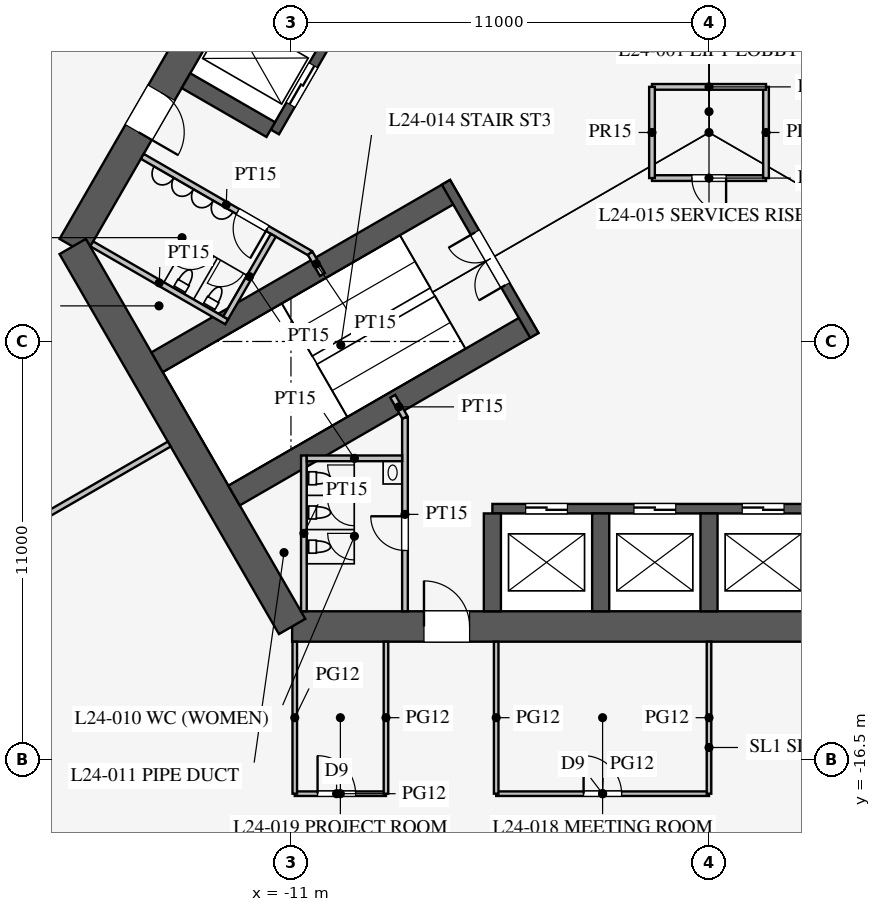
"""IFC4 building model, lengths in metres.
Left out: names, types, materials, properties, quantities, classifications, styles, units other than length and angle.
Written with IfcOpenShell. Run it as: python <this file> out.ifc"""

import sys

from ifc_helpers import new_model, si_unit, direction, frame, frame_2d, origin, place, context, subcontext, project, spatial, rectangle, extrude, element, fill, save


model = new_model("IFC4")
c1 = context("Model", 3, precision=1e-05, world=origin(), true_north=direction((0.0, 1.0)))
c2 = subcontext(c1, "Body", "Model", "MODEL_VIEW")
j1 = project(units=[si_unit("LENGTHUNIT", "METRE"), si_unit("PLANEANGLEUNIT", "RADIAN")], contexts=[c1])
p1 = place(None, origin())
s1 = spatial("IfcSite", under=j1, at=p1, CompositionType="ELEMENT")
p2 = place(p1, origin())
s2 = spatial("IfcBuilding", under=s1, at=p2, CompositionType="ELEMENT")
p3 = place(p2, frame((0.0, 0.0, 107.3)))
s3 = spatial("IfcBuildingStorey", under=s2, at=p3, CompositionType="ELEMENT", Elevation=107.3)
p4 = place(p3, frame((-10.97, -13.0, 0.0), z_axis=(0.0, 0.0, 1.0), x_axis=(1.0, 0.0, 0.0)))
e1 = element("IfcWall", 1, at=p4, inside=s3, PredefinedType="SHEAR", context=c2, shape_type="SweptSolid", body=[
    extrude(rectangle(XDim=21.939, YDim=0.8, at=frame_2d((10.97, 0.0))), origin(), (0.0, 0.0, 1.0), 4.2),
])
p5 = place(p4, frame((17.27, 0.0, 0.0)))
e2 = element("IfcOpeningElement", 2, at=p5, cuts=e1, PredefinedType="OPENING", context=c2, shape_type="SweptSolid", body=[
    extrude(rectangle(XDim=1.2, YDim=2.1, at=frame_2d((0.6, 1.05))), frame((0.0, 0.41, 0.0), z_axis=(0.0, -1.0, 0.0), x_axis=(1.0, 0.0, 0.0)), (0.0, 0.0, 1.0), 0.82),
])
p6 = place(p4, frame((3.47, 0.0, 0.0)))
e3 = element("IfcOpeningElement", 3, at=p6, cuts=e1, PredefinedType="OPENING", context=c2, shape_type="SweptSolid", body=[
    extrude(rectangle(XDim=1.2, YDim=2.1, at=frame_2d((0.6, 1.05))), frame((0.0, 0.41, 0.0), z_axis=(0.0, -1.0, 0.0), x_axis=(1.0, 0.0, 0.0)), (0.0, 0.0, 1.0), 0.82),
])
p7 = place(p3, frame((-5.773, 16.0, 0.0), z_axis=(0.0, 0.0, 1.0), x_axis=(-0.500002442456, -0.866023993627, 0.0)))
e4 = element("IfcWall", 4, at=p7, inside=s3, PredefinedType="SHEAR", context=c2, shape_type="SweptSolid", body=[
    extrude(rectangle(XDim=21.939, YDim=0.8, at=frame_2d((10.97, 0.0))), origin(), (0.0, 0.0, 1.0), 4.2),
])
p8 = place(p7, frame((17.27, 0.0, 0.0)))
e5 = element("IfcOpeningElement", 5, at=p8, cuts=e4, PredefinedType="OPENING", context=c2, shape_type="SweptSolid", body=[
    extrude(rectangle(XDim=1.2, YDim=2.1, at=frame_2d((0.6, 1.05))), frame((0.0, 0.41, 0.0), z_axis=(0.0, -1.0, 0.0), x_axis=(1.0, 0.0, 0.0)), (0.0, 0.0, 1.0), 0.82),
])
p9 = place(p7, frame((3.47, 0.0, 0.0)))
e6 = element("IfcOpeningElement", 6, at=p9, cuts=e4, PredefinedType="OPENING", context=c2, shape_type="SweptSolid", body=[
    extrude(rectangle(XDim=1.2, YDim=2.1, at=frame_2d((0.6, 1.05))), frame((0.0, 0.41, 0.0), z_axis=(0.0, -1.0, 0.0), x_axis=(1.0, 0.0, 0.0)), (0.0, 0.0, 1.0), 0.82),
])
p10 = place(p3, frame((-16.743, -3.0, 0.0), z_axis=(0.0, 0.0, 1.0), x_axis=(0.499995765644, -0.866027848477, 0.0)))
e7 = element("IfcWall", 7, at=p10, inside=s3, PredefinedType="SHEAR", context=c2, shape_type="SweptSolid", body=[
    extrude(rectangle(XDim=11.547, YDim=0.8, at=frame_2d((5.773, 0.0))), origin(), (0.0, 0.0, 1.0), 4.2),
])
p11 = place(p3, frame((-5.7, -9.9, 0.0), z_axis=(0.0, 0.0, 1.0), x_axis=(1.0, 0.0, 0.0)))
e8 = element("IfcWall", 8, at=p11, inside=s3, PredefinedType="SHEAR", context=c2, shape_type="SweptSolid", body=[
    extrude(rectangle(XDim=11.4, YDim=0.25, at=frame_2d((5.7, 0.0))), origin(), (0.0, 0.0, 1.0), 4.2),
])
p12 = place(p11, frame((0.875, 0.0, 0.0)))
e9 = element("IfcOpeningElement", 9, at=p12, cuts=e8, PredefinedType="OPENING", context=c2, shape_type="SweptSolid", body=[
    extrude(rectangle(XDim=1.1, YDim=2.2, at=frame_2d((0.55, 1.1))), frame((0.0, 0.135, 0.0), z_axis=(0.0, -1.0, 0.0), x_axis=(1.0, 0.0, 0.0)), (0.0, 0.0, 1.0), 0.27),
])
p13 = place(p11, frame((3.725, 0.0, 0.0)))
e10 = element("IfcOpeningElement", 10, at=p13, cuts=e8, PredefinedType="OPENING", context=c2, shape_type="SweptSolid", body=[
    extrude(rectangle(XDim=1.1, YDim=2.2, at=frame_2d((0.55, 1.1))), frame((0.0, 0.135, 0.0), z_axis=(0.0, -1.0, 0.0), x_axis=(1.0, 0.0, 0.0)), (0.0, 0.0, 1.0), 0.27),
])
p14 = place(p11, frame((6.575, 0.0, 0.0)))
e11 = element("IfcOpeningElement", 11, at=p14, cuts=e8, PredefinedType="OPENING", context=c2, shape_type="SweptSolid", body=[
    extrude(rectangle(XDim=1.1, YDim=2.2, at=frame_2d((0.55, 1.1))), frame((0.0, 0.135, 0.0), z_axis=(0.0, -1.0, 0.0), x_axis=(1.0, 0.0, 0.0)), (0.0, 0.0, 1.0), 0.27),
])
p15 = place(p11, frame((9.425, 0.0, 0.0)))
e12 = element("IfcOpeningElement", 12, at=p15, cuts=e8, PredefinedType="OPENING", context=c2, shape_type="SweptSolid", body=[
    extrude(rectangle(XDim=1.1, YDim=2.2, at=frame_2d((0.55, 1.1))), frame((0.0, 0.135, 0.0), z_axis=(0.0, -1.0, 0.0), x_axis=(1.0, 0.0, 0.0)), (0.0, 0.0, 1.0), 0.27),
])
for number, where, z_axis, x_axis in (
    (13, (-5.7, -10.025, 0.0), (0.0, 0.0, 1.0), (0.0, -1.0, 0.0)),
    (14, (-2.85, -10.025, 0.0), (0.0, 0.0, 1.0), (0.0, -1.0, 0.0)),
    (15, (0.0, -10.025, 0.0), (0.0, 0.0, 1.0), (0.0, -1.0, 0.0)),
):
    element("IfcWall", number, at=place(p3, frame(where, z_axis=z_axis, x_axis=x_axis)), inside=s3, PredefinedType="SHEAR", context=c2, shape_type="SweptSolid", body=[
        extrude(rectangle(XDim=2.575, YDim=0.45, at=frame_2d((1.288, 0.0))), origin(), (0.0, 0.0, 1.0), 4.2),
    ])
p16 = place(p3, frame((-5.724, 9.886, 0.0), z_axis=(0.0, 0.0, 1.0), x_axis=(-0.500001763848, -0.866024385424, 0.0)))
e16 = element("IfcWall", 16, at=p16, inside=s3, PredefinedType="SHEAR", context=c2, shape_type="SweptSolid", body=[
    extrude(rectangle(XDim=11.4, YDim=0.25, at=frame_2d((5.7, 0.0))), origin(), (0.0, 0.0, 1.0), 4.2),
])
p17 = place(p16, frame((6.525, 0.0, 0.0)))
e17 = element("IfcOpeningElement", 17, at=p17, cuts=e16, PredefinedType="OPENING", context=c2, shape_type="SweptSolid", body=[
    extrude(rectangle(XDim=1.2, YDim=2.2, at=frame_2d((0.6, 1.1))), frame((0.0, 0.135, 0.0), z_axis=(0.0, -1.0, 0.0), x_axis=(1.0, 0.0, 0.0)), (0.0, 0.0, 1.0), 0.27),
])
p18 = place(p16, frame((9.375, 0.0, 0.0)))
e18 = element("IfcOpeningElement", 18, at=p18, cuts=e16, PredefinedType="OPENING", context=c2, shape_type="SweptSolid", body=[
    extrude(rectangle(XDim=1.2, YDim=2.2, at=frame_2d((0.6, 1.1))), frame((0.0, 0.135, 0.0), z_axis=(0.0, -1.0, 0.0), x_axis=(1.0, 0.0, 0.0)), (0.0, 0.0, 1.0), 0.27),
])
p19 = place(p3, frame((-11.532, 0.076, 0.0), z_axis=(0.0, 0.0, 1.0), x_axis=(-0.866005588531, 0.500034319456, 0.0)))
e19 = element("IfcWall", 19, at=p19, inside=s3, PredefinedType="SHEAR", context=c2, shape_type="SweptSolid", body=[
    extrude(rectangle(XDim=2.575, YDim=0.45, at=frame_2d((1.288, 0.0))), origin(), (0.0, 0.0, 1.0), 4.2),
])
for number, where, z_axis, x_axis in (
    (20, (-6.663, -1.509, 0.0), (0.0, 0.0, 1.0), (-0.866, -0.5, 0.0)),
    (21, (-4.638, -5.016, 0.0), (0.0, 0.0, 1.0), (-0.866, -0.5, 0.0)),
):
    element("IfcWall", number, at=place(p3, frame(where, z_axis=z_axis, x_axis=x_axis)), inside=s3, PredefinedType="SHEAR", context=c2, shape_type="SweptSolid", body=[
        extrude(rectangle(XDim=9.075, YDim=0.6, at=frame_2d((4.538, 0.0))), origin(), (0.0, 0.0, 1.0), 4.2),
    ])
p20 = place(p3, frame((-6.922, -1.312, 0.0), z_axis=(0.0, 0.0, 1.0), x_axis=(0.499984536904, -0.866034331223, 0.0)))
e22 = element("IfcWall", 22, at=p20, inside=s3, PredefinedType="SHEAR", context=c2, shape_type="SweptSolid", body=[
    extrude(rectangle(XDim=4.65, YDim=0.25, at=frame_2d((2.325, 0.0))), origin(), (0.0, 0.0, 1.0), 4.2),
])
p21 = place(p20, frame((1.525, 0.0, 0.0)))
e23 = element("IfcOpeningElement", 23, at=p21, cuts=e22, PredefinedType="OPENING", context=c2, shape_type="SweptSolid", body=[
    extrude(rectangle(XDim=1.6, YDim=2.1, at=frame_2d((0.8, 1.05))), frame((0.0, 0.135, 0.0), z_axis=(0.0, -1.0, 0.0), x_axis=(1.0, 0.0, 0.0)), (0.0, 0.0, 1.0), 0.27),
])
p22 = place(p3, frame((-8.0, -7.5, 0.0), z_axis=(0.0, 0.0, 1.0), x_axis=(0.0, -1.0, 0.0)))
e24 = element("IfcWall", 24, at=p22, inside=s3, PredefinedType="PARTITIONING", context=c2, shape_type="SweptSolid", body=[
    extrude(rectangle(XDim=5.1, YDim=0.15, at=frame_2d((2.55, 0.0))), origin(), (0.0, 0.0, 1.0), 4.0),
])
p23 = place(p22, frame((2.6, 0.0, 0.0)))
e25 = element("IfcOpeningElement", 25, at=p23, cuts=e24, PredefinedType="OPENING", context=c2, shape_type="SweptSolid", body=[
    extrude(rectangle(XDim=0.9, YDim=2.1, at=frame_2d((0.45, 1.05))), frame((0.0, 0.085, 0.0), z_axis=(0.0, -1.0, 0.0), x_axis=(1.0, 0.0, 0.0)), (0.0, 0.0, 1.0), 0.17),
])
p24 = place(p3, frame((-10.495, -3.178, 0.0), z_axis=(0.0, 0.0, 1.0), x_axis=(-0.86602216432, 0.500005610874, 0.0)))
e26 = element("IfcWall", 26, at=p24, inside=s3, PredefinedType="PARTITIONING", context=c2, shape_type="SweptSolid", body=[
    extrude(rectangle(XDim=5.1, YDim=0.15, at=frame_2d((2.55, 0.0))), origin(), (0.0, 0.0, 1.0), 4.0),
])
p25 = place(p24, frame((1.3, 0.0, 0.0)))
e27 = element("IfcOpeningElement", 27, at=p25, cuts=e26, PredefinedType="OPENING", context=c2, shape_type="SweptSolid", body=[
    extrude(rectangle(XDim=0.9, YDim=2.1, at=frame_2d((0.45, 1.05))), frame((0.0, 0.085, 0.0), z_axis=(0.0, -1.0, 0.0), x_axis=(1.0, 0.0, 0.0)), (0.0, 0.0, 1.0), 0.17),
])
for number, where, z_axis, x_axis in (
    (28, (-10.495, -3.178, 0.0), (0.0, 0.0, 1.0), (0.5, -0.866, 0.0)),
    (29, (-8.0, -7.5, 0.0), (0.0, 0.0, 1.0), (-0.5, 0.866, 0.0)),
):
    element("IfcWall", number, at=place(p3, frame(where, z_axis=z_axis, x_axis=x_axis)), inside=s3, PredefinedType="PARTITIONING", context=c2, shape_type="SweptSolid", body=[
        extrude(rectangle(XDim=0.645, YDim=0.15, at=frame_2d((0.323, 0.0))), origin(), (0.0, 0.0, 1.0), 4.0),
    ])
p26 = place(p3, frame((-12.691, -4.982, 0.0), z_axis=(0.0, 0.0, 1.0), x_axis=(-0.8660249478, 0.500000789788, 0.0)))
e30 = element("IfcWall", 30, at=p26, inside=s3, PredefinedType="PARTITIONING", context=c2, shape_type="SweptSolid", body=[
    extrude(rectangle(XDim=4.1, YDim=0.15, at=frame_2d((2.05, 0.0))), origin(), (0.0, 0.0, 1.0), 4.0),
])
p27 = place(p3, frame((-11.464, -2.706, 0.0), z_axis=(0.0, 0.0, 1.0), x_axis=(-0.50001992892, -0.866013897511, 0.0)))
e31 = element("IfcWall", 31, at=p27, inside=s3, PredefinedType="PARTITIONING", context=c2, shape_type="SweptSolid", body=[
    extrude(rectangle(XDim=2.51, YDim=0.15, at=frame_2d((1.255, 0.0))), origin(), (0.0, 0.0, 1.0), 4.0),
])
p28 = place(p3, frame((-10.66, -8.5, 0.0), z_axis=(0.0, 0.0, 1.0), x_axis=(0.0, -1.0, 0.0)))
e32 = element("IfcWall", 32, at=p28, inside=s3, PredefinedType="PARTITIONING", context=c2, shape_type="SweptSolid", body=[
    extrude(rectangle(XDim=4.1, YDim=0.15, at=frame_2d((2.05, 0.0))), origin(), (0.0, 0.0, 1.0), 4.0),
])
p29 = place(p3, frame((-8.075, -8.575, 0.0), z_axis=(0.0, 0.0, 1.0), x_axis=(-1.0, 0.0, 0.0)))
e33 = element("IfcWall", 33, at=p29, inside=s3, PredefinedType="PARTITIONING", context=c2, shape_type="SweptSolid", body=[
    extrude(rectangle(XDim=2.51, YDim=0.15, at=frame_2d((1.255, 0.0))), origin(), (0.0, 0.0, 1.0), 4.0),
])
p30 = place(p3, frame((-1.5, -1.2, 0.0), z_axis=(0.0, 0.0, 1.0), x_axis=(1.0, 0.0, 0.0)))
e34 = element("IfcWall", 34, at=p30, inside=s3, PredefinedType="PARTITIONING", context=c2, shape_type="SweptSolid", body=[
    extrude(rectangle(XDim=3.0, YDim=0.15, at=frame_2d((1.5, 0.0))), origin(), (0.0, 0.0, 1.0), 4.0),
])
p31 = place(p30, frame((1.05, 0.0, 0.0)))
e35 = element("IfcOpeningElement", 35, at=p31, cuts=e34, PredefinedType="OPENING", context=c2, shape_type="SweptSolid", body=[
    extrude(rectangle(XDim=0.9, YDim=2.1, at=frame_2d((0.45, 1.05))), frame((0.0, 0.085, 0.0), z_axis=(0.0, -1.0, 0.0), x_axis=(1.0, 0.0, 0.0)), (0.0, 0.0, 1.0), 0.17),
])
p32 = place(p3, frame((1.5, -1.2, 0.0), z_axis=(0.0, 0.0, 1.0), x_axis=(0.0, 1.0, 0.0)))
e36 = element("IfcWall", 36, at=p32, inside=s3, PredefinedType="PARTITIONING", context=c2, shape_type="SweptSolid", body=[
    extrude(rectangle(XDim=2.4, YDim=0.15, at=frame_2d((1.2, 0.0))), origin(), (0.0, 0.0, 1.0), 4.0),
])
p33 = place(p3, frame((1.5, 1.2, 0.0), z_axis=(0.0, 0.0, 1.0), x_axis=(-1.0, 0.0, 0.0)))
e37 = element("IfcWall", 37, at=p33, inside=s3, PredefinedType="PARTITIONING", context=c2, shape_type="SweptSolid", body=[
    extrude(rectangle(XDim=3.0, YDim=0.15, at=frame_2d((1.5, 0.0))), origin(), (0.0, 0.0, 1.0), 4.0),
])
p34 = place(p3, frame((-1.5, 1.2, 0.0), z_axis=(0.0, 0.0, 1.0), x_axis=(0.0, -1.0, 0.0)))
e38 = element("IfcWall", 38, at=p34, inside=s3, PredefinedType="PARTITIONING", context=c2, shape_type="SweptSolid", body=[
    extrude(rectangle(XDim=2.4, YDim=0.15, at=frame_2d((1.2, 0.0))), origin(), (0.0, 0.0, 1.0), 4.0),
])
p35 = place(p3, frame((-14.203, -8.2, 0.0), z_axis=(0.0, 0.0, 1.0), x_axis=(-0.866024668836, -0.500001272966, 0.0)))
e39 = element("IfcWall", 39, at=p35, inside=s3, PredefinedType="PARTITIONING", context=c2, shape_type="SweptSolid", body=[
    extrude(rectangle(XDim=16.65, YDim=0.15, at=frame_2d((8.325, 0.0))), origin(), (0.0, 0.0, 1.0), 2.3),
])
p36 = place(p3, frame((-10.9, -17.4, 0.0), z_axis=(0.0, 0.0, 1.0), x_axis=(1.0, 0.0, 0.0)))
e40 = element("IfcWall", 40, at=p36, inside=s3, PredefinedType="PARTITIONING", context=c2, shape_type="SweptSolid", body=[
    extrude(rectangle(XDim=2.4, YDim=0.12, at=frame_2d((1.2, 0.0))), origin(), (0.0, 0.0, 1.0), 2.9),
])
p37 = place(p36, frame((0.6, 0.0, 0.15)))
e41 = element("IfcOpeningElement", 41, at=p37, cuts=e40, PredefinedType="OPENING", context=c2, shape_type="SweptSolid", body=[
    extrude(rectangle(XDim=1.0, YDim=2.1, at=frame_2d((0.5, 1.05))), frame((0.0, 0.07, 0.0), z_axis=(0.0, -1.0, 0.0), x_axis=(1.0, 0.0, 0.0)), (0.0, 0.0, 1.0), 0.14),
])
p38 = place(p3, frame((-5.6, -17.4, 0.0), z_axis=(0.0, 0.0, 1.0), x_axis=(1.0, 0.0, 0.0)))
e42 = element("IfcWall", 42, at=p38, inside=s3, PredefinedType="PARTITIONING", context=c2, shape_type="SweptSolid", body=[
    extrude(rectangle(XDim=5.6, YDim=0.12, at=frame_2d((2.8, 0.0))), origin(), (0.0, 0.0, 1.0), 2.9),
])
p39 = place(p38, frame((2.3, 0.0, 0.15)))
e43 = element("IfcOpeningElement", 43, at=p39, cuts=e42, PredefinedType="OPENING", context=c2, shape_type="SweptSolid", body=[
    extrude(rectangle(XDim=1.0, YDim=2.1, at=frame_2d((0.5, 1.05))), frame((0.0, 0.07, 0.0), z_axis=(0.0, -1.0, 0.0), x_axis=(1.0, 0.0, 0.0)), (0.0, 0.0, 1.0), 0.14),
])
p40 = place(p3, frame((0.0, -13.4, 0.0), z_axis=(0.0, 0.0, 1.0), x_axis=(0.0, -1.0, 0.0)))
e44 = element("IfcWall", 44, at=p40, inside=s3, PredefinedType="PARTITIONING", context=c2, shape_type="SweptSolid", body=[
    extrude(rectangle(XDim=4.0, YDim=0.12, at=frame_2d((2.0, 0.0))), origin(), (0.0, 0.0, 1.0), 2.8),
])
for number, where, z_axis, x_axis in (
    (45, (-10.9, -13.4, 0.0), (0.0, 0.0, 1.0), (0.0, -1.0, 0.0)),
    (46, (-5.6, -13.4, 0.0), (0.0, 0.0, 1.0), (0.0, -1.0, 0.0)),
    (47, (-8.5, -13.4, 0.0), (0.0, 0.0, 1.0), (0.0, -1.0, 0.0)),
):
    element("IfcWall", number, at=place(p3, frame(where, z_axis=z_axis, x_axis=x_axis)), inside=s3, PredefinedType="PARTITIONING", context=c2, shape_type="SweptSolid", body=[
        extrude(rectangle(XDim=4.0, YDim=0.12, at=frame_2d((2.0, 0.0))), origin(), (0.0, 0.0, 1.0), 2.9),
    ])
p41 = place(p23, frame((0.9, 0.0, 0.0), z_axis=(0.0, 0.0, 1.0), x_axis=(-1.0, 0.0, 0.0)))
e48 = element("IfcDoor", 48, at=p41, inside=s3, OperationType="SINGLE_SWING_RIGHT", PredefinedType="DOOR", context=c2, shape_type="SweptSolid", body=[
    extrude(rectangle(XDim=0.9, YDim=2.1, at=frame_2d((0.45, 1.05))), frame((0.0, 0.025, 0.0), z_axis=(0.0, -1.0, 0.0), x_axis=(1.0, 0.0, 0.0)), (0.0, 0.0, 1.0), 0.05),
])
fill(e25, e48)
p42 = place(p25, origin())
e49 = element("IfcDoor", 49, at=p42, inside=s3, OperationType="SINGLE_SWING_LEFT", PredefinedType="DOOR", context=c2, shape_type="SweptSolid", body=[
    extrude(rectangle(XDim=0.9, YDim=2.1, at=frame_2d((0.45, 1.05))), frame((0.0, 0.025, 0.0), z_axis=(0.0, -1.0, 0.0), x_axis=(1.0, 0.0, 0.0)), (0.0, 0.0, 1.0), 0.05),
])
fill(e27, e49)
p43 = place(p31, frame((0.9, 0.0, 0.0), z_axis=(0.0, 0.0, 1.0), x_axis=(-1.0, 0.0, 0.0)))
e50 = element("IfcDoor", 50, at=p43, inside=s3, OperationType="SINGLE_SWING_LEFT", PredefinedType="DOOR", context=c2, shape_type="SweptSolid", body=[
    extrude(rectangle(XDim=0.9, YDim=2.1, at=frame_2d((0.45, 1.05))), frame((0.0, 0.025, 0.0), z_axis=(0.0, -1.0, 0.0), x_axis=(1.0, 0.0, 0.0)), (0.0, 0.0, 1.0), 0.05),
])
fill(e35, e50)
p44 = place(p21, frame((1.6, 0.0, 0.0), z_axis=(0.0, 0.0, 1.0), x_axis=(-1.0, 0.0, 0.0)))
e51 = element("IfcDoor", 51, at=p44, inside=s3, OperationType="DOUBLE_DOOR_SINGLE_SWING", PredefinedType="DOOR", context=c2, shape_type="SweptSolid", body=[
    extrude(rectangle(XDim=1.6, YDim=2.1, at=frame_2d((0.8, 1.05))), frame((0.0, 0.025, 0.0), z_axis=(0.0, -1.0, 0.0), x_axis=(1.0, 0.0, 0.0)), (0.0, 0.0, 1.0), 0.05),
])
fill(e23, e51)
p45 = place(p6, origin())
e52 = element("IfcDoor", 52, at=p45, inside=s3, OperationType="SINGLE_SWING_LEFT", PredefinedType="DOOR", context=c2, shape_type="SweptSolid", body=[
    extrude(rectangle(XDim=1.2, YDim=2.1, at=frame_2d((0.6, 1.05))), frame((0.0, 0.025, 0.0), z_axis=(0.0, -1.0, 0.0), x_axis=(1.0, 0.0, 0.0)), (0.0, 0.0, 1.0), 0.05),
])
fill(e3, e52)
p46 = place(p8, origin())
e53 = element("IfcDoor", 53, at=p46, inside=s3, OperationType="SINGLE_SWING_RIGHT", PredefinedType="DOOR", context=c2, shape_type="SweptSolid", body=[
    extrude(rectangle(XDim=1.2, YDim=2.1, at=frame_2d((0.6, 1.05))), frame((0.0, 0.025, 0.0), z_axis=(0.0, -1.0, 0.0), x_axis=(1.0, 0.0, 0.0)), (0.0, 0.0, 1.0), 0.05),
])
fill(e5, e53)
p47 = place(p39, origin())
e54 = element("IfcDoor", 54, at=p47, inside=s3, OperationType="SINGLE_SWING_LEFT", PredefinedType="DOOR", context=c2, shape_type="SweptSolid", body=[
    extrude(rectangle(XDim=1.0, YDim=2.1, at=frame_2d((0.5, 1.05))), frame((0.0, 0.025, 0.0), z_axis=(0.0, -1.0, 0.0), x_axis=(1.0, 0.0, 0.0)), (0.0, 0.0, 1.0), 0.05),
])
fill(e43, e54)
p48 = place(p37, origin())
e55 = element("IfcDoor", 55, at=p48, inside=s3, OperationType="SINGLE_SWING_LEFT", PredefinedType="DOOR", context=c2, shape_type="SweptSolid", body=[
    extrude(rectangle(XDim=1.0, YDim=2.1, at=frame_2d((0.5, 1.05))), frame((0.0, 0.025, 0.0), z_axis=(0.0, -1.0, 0.0), x_axis=(1.0, 0.0, 0.0)), (0.0, 0.0, 1.0), 0.05),
])
fill(e41, e55)
p49 = place(p12, origin())
e56 = element("IfcDoor", 56, at=p49, inside=s3, OperationType="DOUBLE_DOOR_SLIDING", PredefinedType="DOOR", context=c2, shape_type="SweptSolid", body=[
    extrude(rectangle(XDim=1.1, YDim=2.2, at=frame_2d((0.55, 1.1))), frame((0.0, 0.025, 0.0), z_axis=(0.0, -1.0, 0.0), x_axis=(1.0, 0.0, 0.0)), (0.0, 0.0, 1.0), 0.05),
])
fill(e9, e56)
p50 = place(p13, origin())
e57 = element("IfcDoor", 57, at=p50, inside=s3, OperationType="DOUBLE_DOOR_SLIDING", PredefinedType="DOOR", context=c2, shape_type="SweptSolid", body=[
    extrude(rectangle(XDim=1.1, YDim=2.2, at=frame_2d((0.55, 1.1))), frame((0.0, 0.025, 0.0), z_axis=(0.0, -1.0, 0.0), x_axis=(1.0, 0.0, 0.0)), (0.0, 0.0, 1.0), 0.05),
])
fill(e10, e57)
p51 = place(p14, origin())
e58 = element("IfcDoor", 58, at=p51, inside=s3, OperationType="DOUBLE_DOOR_SLIDING", PredefinedType="DOOR", context=c2, shape_type="SweptSolid", body=[
    extrude(rectangle(XDim=1.1, YDim=2.2, at=frame_2d((0.55, 1.1))), frame((0.0, 0.025, 0.0), z_axis=(0.0, -1.0, 0.0), x_axis=(1.0, 0.0, 0.0)), (0.0, 0.0, 1.0), 0.05),
])
fill(e11, e58)
p52 = place(p18, origin())
e59 = element("IfcDoor", 59, at=p52, inside=s3, OperationType="DOUBLE_DOOR_SLIDING", PredefinedType="DOOR", context=c2, shape_type="SweptSolid", body=[
    extrude(rectangle(XDim=1.2, YDim=2.2, at=frame_2d((0.6, 1.1))), frame((0.0, 0.025, 0.0), z_axis=(0.0, -1.0, 0.0), x_axis=(1.0, 0.0, 0.0)), (0.0, 0.0, 1.0), 0.05),
])
fill(e18, e59)
save(model, sys.argv[1])
